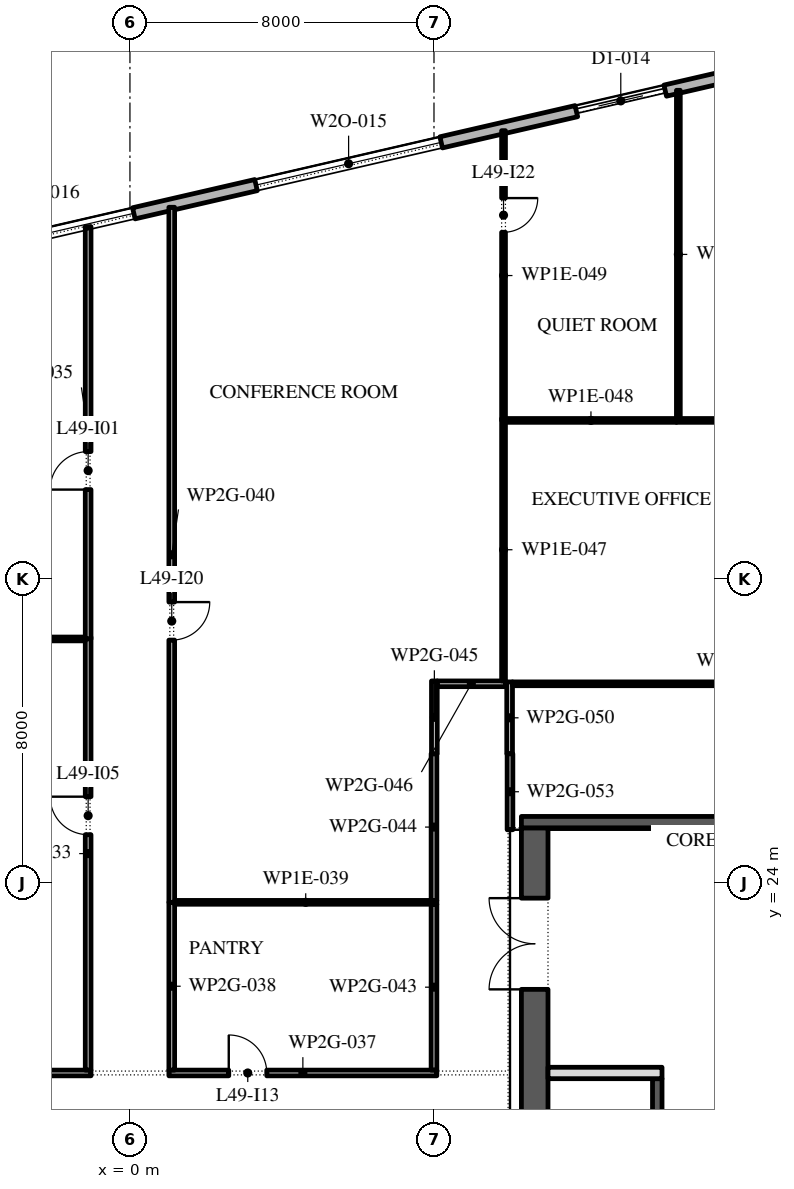
"""IFC4 building model, lengths in metres.
Left out: names, types, materials, properties, quantities, classifications, styles, units other than length and angle.
Written with IfcOpenShell. Run it as: python <this file> out.ifc"""

import sys

from ifc_helpers import new_model, si_unit, direction, frame, frame_2d, origin, place, context, subcontext, project, spatial, rectangle, extrude, element, fill, save


model = new_model("IFC4")
c1 = context("Model", 3, precision=1e-05, world=origin(), true_north=direction((0.0, 1.0)))
c2 = subcontext(c1, "Body", "Model", "MODEL_VIEW")
j1 = project(units=[si_unit("LENGTHUNIT", "METRE"), si_unit("PLANEANGLEUNIT", "RADIAN")], contexts=[c1])
p1 = place(None, origin())
s1 = spatial("IfcSite", under=j1, at=p1, CompositionType="ELEMENT")
p2 = place(p1, origin())
s2 = spatial("IfcBuilding", under=s1, at=p2, CompositionType="ELEMENT")
p3 = place(p2, frame((0.0, 0.0, 222.0)))
s3 = spatial("IfcBuildingStorey", under=s2, at=p3, CompositionType="ELEMENT", Elevation=222.0)
p4 = place(p3, frame((17.592, 45.657, 0.0), z_axis=(0.0, 0.0, 1.0), x_axis=(-0.974370243697, -0.224950279389, 0.0)))
e1 = element("IfcWall", 1, at=p4, inside=s3, PredefinedType="STANDARD", context=c2, shape_type="SweptSolid", body=[
    extrude(rectangle(XDim=49.5, YDim=0.3, at=frame_2d((24.75, 0.0))), origin(), (0.0, 0.0, 1.0), 3.75),
])
p5 = place(p4, frame((3.6, 0.0, 0.0)))
e2 = element("IfcOpeningElement", 2, at=p5, cuts=e1, PredefinedType="OPENING", context=c2, shape_type="SweptSolid", body=[
    extrude(rectangle(XDim=2.4, YDim=3.5, at=frame_2d((1.2, 1.75))), frame((0.0, 0.16, 0.0), z_axis=(0.0, -1.0, 0.0), x_axis=(1.0, 0.0, 0.0)), (0.0, 0.0, 1.0), 0.32),
])
p6 = place(p4, frame((9.65, 0.0, 0.45)))
e3 = element("IfcOpeningElement", 3, at=p6, cuts=e1, PredefinedType="OPENING", context=c2, shape_type="SweptSolid", body=[
    extrude(rectangle(XDim=5.0, YDim=2.2, at=frame_2d((2.5, 1.1))), frame((0.0, 0.16, 0.0), z_axis=(0.0, -1.0, 0.0), x_axis=(1.0, 0.0, 0.0)), (0.0, 0.0, 1.0), 0.32),
])
p7 = place(p4, frame((17.95, 0.0, 0.45)))
e4 = element("IfcOpeningElement", 4, at=p7, cuts=e1, PredefinedType="OPENING", context=c2, shape_type="SweptSolid", body=[
    extrude(rectangle(XDim=5.0, YDim=2.2, at=frame_2d((2.5, 1.1))), frame((0.0, 0.16, 0.0), z_axis=(0.0, -1.0, 0.0), x_axis=(1.0, 0.0, 0.0)), (0.0, 0.0, 1.0), 0.32),
])
p8 = place(p4, frame((26.25, 0.0, 0.45)))
e5 = element("IfcOpeningElement", 5, at=p8, cuts=e1, PredefinedType="OPENING", context=c2, shape_type="SweptSolid", body=[
    extrude(rectangle(XDim=5.0, YDim=2.2, at=frame_2d((2.5, 1.1))), frame((0.0, 0.16, 0.0), z_axis=(0.0, -1.0, 0.0), x_axis=(1.0, 0.0, 0.0)), (0.0, 0.0, 1.0), 0.32),
])
p9 = place(p4, frame((35.85, 0.0, 0.0)))
e6 = element("IfcOpeningElement", 6, at=p9, cuts=e1, PredefinedType="OPENING", context=c2, shape_type="SweptSolid", body=[
    extrude(rectangle(XDim=2.4, YDim=2.7, at=frame_2d((1.2, 1.35))), frame((0.0, 0.16, 0.0), z_axis=(0.0, -1.0, 0.0), x_axis=(1.0, 0.0, 0.0)), (0.0, 0.0, 1.0), 0.32),
])
p10 = place(p4, frame((42.85, 0.0, 0.45)))
e7 = element("IfcOpeningElement", 7, at=p10, cuts=e1, PredefinedType="OPENING", context=c2, shape_type="SweptSolid", body=[
    extrude(rectangle(XDim=5.0, YDim=2.275, at=frame_2d((2.5, 1.137))), frame((0.0, 0.16, 0.0), z_axis=(0.0, -1.0, 0.0), x_axis=(1.0, 0.0, 0.0)), (0.0, 0.0, 1.0), 0.32),
])
p11 = place(p3, frame((10.65, -2.45, 0.0), z_axis=(0.0, 0.0, 1.0), x_axis=(0.0, 1.0, 0.0)))
e8 = element("IfcWall", 8, at=p11, inside=s3, PredefinedType="SHEAR", context=c2, shape_type="SweptSolid", body=[
    extrude(rectangle(XDim=27.9, YDim=0.7, at=frame_2d((13.95, 0.0))), origin(), (0.0, 0.0, 1.0), 3.75),
])
p12 = place(p11, frame((23.65, 0.0, 0.0)))
e9 = element("IfcOpeningElement", 9, at=p12, cuts=e8, PredefinedType="OPENING", context=c2, shape_type="SweptSolid", body=[
    extrude(rectangle(XDim=2.4, YDim=2.1, at=frame_2d((1.2, 1.05))), frame((0.0, 0.36, 0.0), z_axis=(0.0, -1.0, 0.0), x_axis=(1.0, 0.0, 0.0)), (0.0, 0.0, 1.0), 0.72),
])
p13 = place(p11, frame((0.788, 0.0, 0.0)))
e10 = element("IfcOpeningElement", 10, at=p13, cuts=e8, PredefinedType="OPENING", context=c2, shape_type="SweptSolid", body=[
    extrude(rectangle(XDim=0.9, YDim=2.1, at=frame_2d((0.45, 1.05))), frame((0.0, 0.36, 0.0), z_axis=(0.0, -1.0, 0.0), x_axis=(1.0, 0.0, 0.0)), (0.0, 0.0, 1.0), 0.72),
])
p14 = place(p11, frame((3.962, 0.0, 0.0)))
e11 = element("IfcOpeningElement", 11, at=p14, cuts=e8, PredefinedType="OPENING", context=c2, shape_type="SweptSolid", body=[
    extrude(rectangle(XDim=1.0, YDim=2.1, at=frame_2d((0.5, 1.05))), frame((0.0, 0.36, 0.0), z_axis=(0.0, -1.0, 0.0), x_axis=(1.0, 0.0, 0.0)), (0.0, 0.0, 1.0), 0.72),
])
p15 = place(p3, frame((10.3, 25.6, 0.0), z_axis=(0.0, 0.0, 1.0), x_axis=(1.0, 0.0, 0.0)))
e12 = element("IfcWall", 12, at=p15, inside=s3, PredefinedType="SHEAR", context=c2, shape_type="SweptSolid", body=[
    extrude(rectangle(XDim=11.4, YDim=0.3, at=frame_2d((5.7, 0.0))), origin(), (0.0, 0.0, 1.0), 3.75),
])
p16 = place(p3, frame((13.875, -2.45, 0.0), z_axis=(0.0, 0.0, 1.0), x_axis=(0.0, 1.0, 0.0)))
e13 = element("IfcWall", 13, at=p16, inside=s3, PredefinedType="SHEAR", context=c2, shape_type="SweptSolid", body=[
    extrude(rectangle(XDim=21.3, YDim=0.25, at=frame_2d((10.65, 0.0))), origin(), (0.0, 0.0, 1.0), 3.75),
])
p17 = place(p16, frame((17.786, 0.0, 0.0)))
e14 = element("IfcOpeningElement", 14, at=p17, cuts=e13, PredefinedType="OPENING", context=c2, shape_type="SweptSolid", body=[
    extrude(rectangle(XDim=0.9, YDim=2.1, at=frame_2d((0.45, 1.05))), frame((0.0, 0.135, 0.0), z_axis=(0.0, -1.0, 0.0), x_axis=(1.0, 0.0, 0.0)), (0.0, 0.0, 1.0), 0.27),
])
p18 = place(p16, frame((6.971, 0.0, 0.0)))
e15 = element("IfcOpeningElement", 15, at=p18, cuts=e13, PredefinedType="OPENING", context=c2, shape_type="SweptSolid", body=[
    extrude(rectangle(XDim=1.1, YDim=2.1, at=frame_2d((0.55, 1.05))), frame((0.0, 0.135, 0.0), z_axis=(0.0, -1.0, 0.0), x_axis=(1.0, 0.0, 0.0)), (0.0, 0.0, 1.0), 0.27),
])
p19 = place(p16, frame((9.114, 0.0, 0.0)))
e16 = element("IfcOpeningElement", 16, at=p19, cuts=e13, PredefinedType="OPENING", context=c2, shape_type="SweptSolid", body=[
    extrude(rectangle(XDim=1.1, YDim=2.1, at=frame_2d((0.55, 1.05))), frame((0.0, 0.135, 0.0), z_axis=(0.0, -1.0, 0.0), x_axis=(1.0, 0.0, 0.0)), (0.0, 0.0, 1.0), 0.27),
])
p20 = place(p16, frame((11.257, 0.0, 0.0)))
e17 = element("IfcOpeningElement", 17, at=p20, cuts=e13, PredefinedType="OPENING", context=c2, shape_type="SweptSolid", body=[
    extrude(rectangle(XDim=1.1, YDim=2.1, at=frame_2d((0.55, 1.05))), frame((0.0, 0.135, 0.0), z_axis=(0.0, -1.0, 0.0), x_axis=(1.0, 0.0, 0.0)), (0.0, 0.0, 1.0), 0.27),
])
p21 = place(p16, frame((13.4, 0.0, 0.0)))
e18 = element("IfcOpeningElement", 18, at=p21, cuts=e13, PredefinedType="OPENING", context=c2, shape_type="SweptSolid", body=[
    extrude(rectangle(XDim=1.1, YDim=2.1, at=frame_2d((0.55, 1.05))), frame((0.0, 0.135, 0.0), z_axis=(0.0, -1.0, 0.0), x_axis=(1.0, 0.0, 0.0)), (0.0, 0.0, 1.0), 0.27),
])
p22 = place(p3, frame((11.0, 19.0, 0.0), z_axis=(0.0, 0.0, 1.0), x_axis=(1.0, 0.0, 0.0)))
e19 = element("IfcWall", 19, at=p22, inside=s3, PredefinedType="PARTITIONING", context=c2, shape_type="SweptSolid", body=[
    extrude(rectangle(XDim=3.0, YDim=0.3, at=frame_2d((1.5, 0.0))), origin(), (0.0, 0.0, 1.0), 3.75),
])
p23 = place(p3, frame((-8.075, 19.0, 0.0), z_axis=(0.0, 0.0, 1.0), x_axis=(1.0, 0.0, 0.0)))
e20 = element("IfcWall", 20, at=p23, inside=s3, PredefinedType="PARTITIONING", context=c2, shape_type="SweptSolid", body=[
    extrude(rectangle(XDim=7.05, YDim=0.15, at=frame_2d((3.525, 0.0))), origin(), (0.0, 0.0, 1.0), 3.75),
])
p24 = place(p3, frame((-1.1, 19.075, 0.0), z_axis=(0.0, 0.0, 1.0), x_axis=(0.0, 1.0, 0.0)))
e21 = element("IfcWall", 21, at=p24, inside=s3, PredefinedType="PARTITIONING", context=c2, shape_type="SweptSolid", body=[
    extrude(rectangle(XDim=11.395, YDim=0.15, at=frame_2d((5.698, 0.0))), origin(), (0.0, 0.0, 1.0), 3.75),
])
p25 = place(p24, frame((6.195, 0.0, 0.0)))
e22 = element("IfcOpeningElement", 22, at=p25, cuts=e21, PredefinedType="OPENING", context=c2, shape_type="SweptSolid", body=[
    extrude(rectangle(XDim=1.0, YDim=2.1, at=frame_2d((0.5, 1.05))), frame((0.0, 0.085, 0.0), z_axis=(0.0, -1.0, 0.0), x_axis=(1.0, 0.0, 0.0)), (0.0, 0.0, 1.0), 0.17),
])
p26 = place(p3, frame((-1.175, 30.42, 0.0), z_axis=(0.0, 0.0, 1.0), x_axis=(-1.0, 0.0, 0.0)))
e23 = element("IfcWall", 23, at=p26, inside=s3, PredefinedType="PARTITIONING", context=c2, shape_type="SweptSolid", body=[
    extrude(rectangle(XDim=5.165, YDim=0.1, at=frame_2d((2.583, 0.0))), origin(), (0.0, 0.0, 1.0), 3.75),
])
p27 = place(p3, frame((-1.1, 30.42, 0.0), z_axis=(0.0, 0.0, 1.0), x_axis=(0.0, 1.0, 0.0)))
e24 = element("IfcWall", 24, at=p27, inside=s3, PredefinedType="PARTITIONING", context=c2, shape_type="SweptSolid", body=[
    extrude(rectangle(XDim=10.85, YDim=0.15, at=frame_2d((5.425, 0.0))), origin(), (0.0, 0.0, 1.0), 3.75),
])
p28 = place(p27, frame((3.93, 0.0, 0.0)))
e25 = element("IfcOpeningElement", 25, at=p28, cuts=e24, PredefinedType="OPENING", context=c2, shape_type="SweptSolid", body=[
    extrude(rectangle(XDim=1.0, YDim=2.1, at=frame_2d((0.5, 1.05))), frame((0.0, 0.085, 0.0), z_axis=(0.0, -1.0, 0.0), x_axis=(1.0, 0.0, 0.0)), (0.0, 0.0, 1.0), 0.17),
])
p29 = place(p3, frame((1.025, 19.0, 0.0), z_axis=(0.0, 0.0, 1.0), x_axis=(1.0, 0.0, 0.0)))
e26 = element("IfcWall", 26, at=p29, inside=s3, PredefinedType="PARTITIONING", context=c2, shape_type="SweptSolid", body=[
    extrude(rectangle(XDim=7.05, YDim=0.15, at=frame_2d((3.525, 0.0))), origin(), (0.0, 0.0, 1.0), 3.75),
])
p30 = place(p29, frame((1.575, 0.0, 0.0)))
e27 = element("IfcOpeningElement", 27, at=p30, cuts=e26, PredefinedType="OPENING", context=c2, shape_type="SweptSolid", body=[
    extrude(rectangle(XDim=1.0, YDim=2.1, at=frame_2d((0.5, 1.05))), frame((0.0, 0.085, 0.0), z_axis=(0.0, -1.0, 0.0), x_axis=(1.0, 0.0, 0.0)), (0.0, 0.0, 1.0), 0.17),
])
p31 = place(p3, frame((1.1, 23.49, 0.0), z_axis=(0.0, 0.0, 1.0), x_axis=(0.0, -1.0, 0.0)))
e28 = element("IfcWall", 28, at=p31, inside=s3, PredefinedType="PARTITIONING", context=c2, shape_type="SweptSolid", body=[
    extrude(rectangle(XDim=4.415, YDim=0.15, at=frame_2d((2.208, 0.0))), origin(), (0.0, 0.0, 1.0), 3.75),
])
p32 = place(p3, frame((1.175, 23.49, 0.0), z_axis=(0.0, 0.0, 1.0), x_axis=(1.0, 0.0, 0.0)))
e29 = element("IfcWall", 29, at=p32, inside=s3, PredefinedType="PARTITIONING", context=c2, shape_type="SweptSolid", body=[
    extrude(rectangle(XDim=6.9, YDim=0.1, at=frame_2d((3.45, 0.0))), origin(), (0.0, 0.0, 1.0), 3.75),
])
p33 = place(p3, frame((1.1, 41.778, 0.0), z_axis=(0.0, 0.0, 1.0), x_axis=(0.0, -1.0, 0.0)))
e30 = element("IfcWall", 30, at=p33, inside=s3, PredefinedType="PARTITIONING", context=c2, shape_type="SweptSolid", body=[
    extrude(rectangle(XDim=18.288, YDim=0.15, at=frame_2d((9.144, 0.0))), origin(), (0.0, 0.0, 1.0), 3.75),
])
p34 = place(p33, frame((10.388, 0.0, 0.0)))
e31 = element("IfcOpeningElement", 31, at=p34, cuts=e30, PredefinedType="OPENING", context=c2, shape_type="SweptSolid", body=[
    extrude(rectangle(XDim=1.0, YDim=2.1, at=frame_2d((0.5, 1.05))), frame((0.0, 0.085, 0.0), z_axis=(0.0, -1.0, 0.0), x_axis=(1.0, 0.0, 0.0)), (0.0, 0.0, 1.0), 0.17),
])
p35 = place(p3, frame((8.0, 19.075, 0.0), z_axis=(0.0, 0.0, 1.0), x_axis=(0.0, 1.0, 0.0)))
e32 = element("IfcWall", 32, at=p35, inside=s3, PredefinedType="PARTITIONING", context=c2, shape_type="SweptSolid", body=[
    extrude(rectangle(XDim=4.365, YDim=0.15, at=frame_2d((2.183, 0.0))), origin(), (0.0, 0.0, 1.0), 3.75),
])
p36 = place(p3, frame((8.0, 23.54, 0.0), z_axis=(0.0, 0.0, 1.0), x_axis=(0.0, 1.0, 0.0)))
e33 = element("IfcWall", 33, at=p36, inside=s3, PredefinedType="PARTITIONING", context=c2, shape_type="SweptSolid", body=[
    extrude(rectangle(XDim=3.86, YDim=0.15, at=frame_2d((1.93, 0.0))), origin(), (0.0, 0.0, 1.0), 3.75),
])
p37 = place(p3, frame((8.01, 27.4, 0.0), z_axis=(0.0, 0.0, 1.0), x_axis=(0.0, 1.0, 0.0)))
e34 = element("IfcWall", 34, at=p37, inside=s3, PredefinedType="PARTITIONING", context=c2, shape_type="SweptSolid", body=[
    extrude(rectangle(XDim=1.915, YDim=0.15, at=frame_2d((0.958, 0.0))), origin(), (0.0, 0.0, 1.0), 3.75),
])
p38 = place(p3, frame((8.085, 29.24, 0.0), z_axis=(0.0, 0.0, 1.0), x_axis=(1.0, 0.0, 0.0)))
e35 = element("IfcWall", 35, at=p38, inside=s3, PredefinedType="PARTITIONING", context=c2, shape_type="SweptSolid", body=[
    extrude(rectangle(XDim=1.795, YDim=0.15, at=frame_2d((0.897, 0.0))), origin(), (0.0, 0.0, 1.0), 3.75),
])
p39 = place(p3, frame((9.83, 36.22, 0.0), z_axis=(0.0, 0.0, 1.0), x_axis=(0.0, -1.0, 0.0)))
e36 = element("IfcWall", 36, at=p39, inside=s3, PredefinedType="PARTITIONING", context=c2, shape_type="SweptSolid", body=[
    extrude(rectangle(XDim=6.905, YDim=0.1, at=frame_2d((3.453, 0.0))), origin(), (0.0, 0.0, 1.0), 3.75),
])
p40 = place(p3, frame((9.88, 36.17, 0.0), z_axis=(0.0, 0.0, 1.0), x_axis=(1.0, 0.0, 0.0)))
e37 = element("IfcWall", 37, at=p40, inside=s3, PredefinedType="PARTITIONING", context=c2, shape_type="SweptSolid", body=[
    extrude(rectangle(XDim=4.5, YDim=0.1, at=frame_2d((2.25, 0.0))), origin(), (0.0, 0.0, 1.0), 3.75),
])
p41 = place(p3, frame((9.83, 43.794, 0.0), z_axis=(0.0, 0.0, 1.0), x_axis=(0.0, -1.0, 0.0)))
e38 = element("IfcWall", 38, at=p41, inside=s3, PredefinedType="PARTITIONING", context=c2, shape_type="SweptSolid", body=[
    extrude(rectangle(XDim=7.624, YDim=0.1, at=frame_2d((3.812, 0.0))), origin(), (0.0, 0.0, 1.0), 3.75),
])
p42 = place(p41, frame((1.774, 0.0, 0.0)))
e39 = element("IfcOpeningElement", 39, at=p42, cuts=e38, PredefinedType="OPENING", context=c2, shape_type="SweptSolid", body=[
    extrude(rectangle(XDim=0.9, YDim=2.1, at=frame_2d((0.45, 1.05))), frame((0.0, 0.06, 0.0), z_axis=(0.0, -1.0, 0.0), x_axis=(1.0, 0.0, 0.0)), (0.0, 0.0, 1.0), 0.12),
])
p43 = place(p3, frame((9.99, 29.29, 0.0), z_axis=(0.0, 0.0, 1.0), x_axis=(0.0, -1.0, 0.0)))
e40 = element("IfcWall", 40, at=p43, inside=s3, PredefinedType="PARTITIONING", context=c2, shape_type="SweptSolid", body=[
    extrude(rectangle(XDim=1.89, YDim=0.15, at=frame_2d((0.945, 0.0))), origin(), (0.0, 0.0, 1.0), 3.75),
])
p44 = place(p3, frame((10.065, 29.24, 0.0), z_axis=(0.0, 0.0, 1.0), x_axis=(1.0, 0.0, 0.0)))
e41 = element("IfcWall", 41, at=p44, inside=s3, PredefinedType="PARTITIONING", context=c2, shape_type="SweptSolid", body=[
    extrude(rectangle(XDim=11.945, YDim=0.1, at=frame_2d((5.973, 0.0))), origin(), (0.0, 0.0, 1.0), 3.75),
])
p45 = place(p3, frame((10.0, 27.4, 0.0), z_axis=(0.0, 0.0, 1.0), x_axis=(0.0, -1.0, 0.0)))
e42 = element("IfcWall", 42, at=p45, inside=s3, PredefinedType="PARTITIONING", context=c2, shape_type="SweptSolid", body=[
    extrude(rectangle(XDim=2.0, YDim=0.15, at=frame_2d((1.0, 0.0))), origin(), (0.0, 0.0, 1.0), 3.75),
])
p46 = place(p3, frame((14.38, 36.17, 0.0), z_axis=(0.0, 0.0, 1.0), x_axis=(1.0, 0.0, 0.0)))
e43 = element("IfcWall", 43, at=p46, inside=s3, PredefinedType="PARTITIONING", context=c2, shape_type="SweptSolid", body=[
    extrude(rectangle(XDim=9.18, YDim=0.1, at=frame_2d((4.59, 0.0))), origin(), (0.0, 0.0, 1.0), 3.75),
])
p47 = place(p46, frame((2.3, 0.0, 0.0)))
e44 = element("IfcOpeningElement", 44, at=p47, cuts=e43, PredefinedType="OPENING", context=c2, shape_type="SweptSolid", body=[
    extrude(rectangle(XDim=0.9, YDim=2.1, at=frame_2d((0.45, 1.05))), frame((0.0, 0.06, 0.0), z_axis=(0.0, -1.0, 0.0), x_axis=(1.0, 0.0, 0.0)), (0.0, 0.0, 1.0), 0.12),
])
p48 = place(p3, frame((14.43, 44.856, 0.0), z_axis=(0.0, 0.0, 1.0), x_axis=(0.0, -1.0, 0.0)))
e45 = element("IfcWall", 45, at=p48, inside=s3, PredefinedType="PARTITIONING", context=c2, shape_type="SweptSolid", body=[
    extrude(rectangle(XDim=8.636, YDim=0.1, at=frame_2d((4.318, 0.0))), origin(), (0.0, 0.0, 1.0), 3.75),
])
p49 = place(p5, origin())
e46 = element("IfcDoor", 46, at=p49, inside=s3, OperationType="DOUBLE_DOOR_SLIDING", PredefinedType="DOOR", context=c2, shape_type="SweptSolid", body=[
    extrude(rectangle(XDim=2.4, YDim=3.5, at=frame_2d((1.2, 1.75))), frame((0.0, 0.025, 0.0), z_axis=(0.0, -1.0, 0.0), x_axis=(1.0, 0.0, 0.0)), (0.0, 0.0, 1.0), 0.05),
])
fill(e2, e46)
p50 = place(p6, origin())
e47 = element("IfcWindow", 47, at=p50, inside=s3, PartitioningType="DOUBLE_PANEL_VERTICAL", PredefinedType="WINDOW", context=c2, shape_type="SweptSolid", body=[
    extrude(rectangle(XDim=5.0, YDim=2.2, at=frame_2d((2.5, 1.1))), frame((0.0, 0.03, 0.0), z_axis=(0.0, -1.0, 0.0), x_axis=(1.0, 0.0, 0.0)), (0.0, 0.0, 1.0), 0.06),
])
fill(e3, e47)
p51 = place(p7, origin())
e48 = element("IfcWindow", 48, at=p51, inside=s3, PartitioningType="DOUBLE_PANEL_VERTICAL", PredefinedType="WINDOW", context=c2, shape_type="SweptSolid", body=[
    extrude(rectangle(XDim=5.0, YDim=2.2, at=frame_2d((2.5, 1.1))), frame((0.0, 0.03, 0.0), z_axis=(0.0, -1.0, 0.0), x_axis=(1.0, 0.0, 0.0)), (0.0, 0.0, 1.0), 0.06),
])
fill(e4, e48)
p52 = place(p12, origin())
e49 = element("IfcDoor", 49, at=p52, inside=s3, OperationType="DOUBLE_DOOR_SINGLE_SWING", PredefinedType="DOOR", context=c2, shape_type="SweptSolid", body=[
    extrude(rectangle(XDim=2.4, YDim=2.1, at=frame_2d((1.2, 1.05))), frame((0.0, 0.025, 0.0), z_axis=(0.0, -1.0, 0.0), x_axis=(1.0, 0.0, 0.0)), (0.0, 0.0, 1.0), 0.05),
])
fill(e9, e49)
p53 = place(p28, origin())
e50 = element("IfcDoor", 50, at=p53, inside=s3, OperationType="SINGLE_SWING_RIGHT", PredefinedType="DOOR", context=c2, shape_type="SweptSolid", body=[
    extrude(rectangle(XDim=1.0, YDim=2.1, at=frame_2d((0.5, 1.05))), frame((0.0, 0.025, 0.0), z_axis=(0.0, -1.0, 0.0), x_axis=(1.0, 0.0, 0.0)), (0.0, 0.0, 1.0), 0.05),
])
fill(e25, e50)
p54 = place(p25, origin())
e51 = element("IfcDoor", 51, at=p54, inside=s3, OperationType="SINGLE_SWING_LEFT", PredefinedType="DOOR", context=c2, shape_type="SweptSolid", body=[
    extrude(rectangle(XDim=1.0, YDim=2.1, at=frame_2d((0.5, 1.05))), frame((0.0, 0.025, 0.0), z_axis=(0.0, -1.0, 0.0), x_axis=(1.0, 0.0, 0.0)), (0.0, 0.0, 1.0), 0.05),
])
fill(e22, e51)
p55 = place(p30, origin())
e52 = element("IfcDoor", 52, at=p55, inside=s3, OperationType="SINGLE_SWING_RIGHT", PredefinedType="DOOR", context=c2, shape_type="SweptSolid", body=[
    extrude(rectangle(XDim=1.0, YDim=2.1, at=frame_2d((0.5, 1.05))), frame((0.0, 0.025, 0.0), z_axis=(0.0, -1.0, 0.0), x_axis=(1.0, 0.0, 0.0)), (0.0, 0.0, 1.0), 0.05),
])
fill(e27, e52)
p56 = place(p34, origin())
e53 = element("IfcDoor", 53, at=p56, inside=s3, OperationType="SINGLE_SWING_RIGHT", PredefinedType="DOOR", context=c2, shape_type="SweptSolid", body=[
    extrude(rectangle(XDim=1.0, YDim=2.1, at=frame_2d((0.5, 1.05))), frame((0.0, 0.025, 0.0), z_axis=(0.0, -1.0, 0.0), x_axis=(1.0, 0.0, 0.0)), (0.0, 0.0, 1.0), 0.05),
])
fill(e31, e53)
p57 = place(p42, origin())
e54 = element("IfcDoor", 54, at=p57, inside=s3, OperationType="SINGLE_SWING_RIGHT", PredefinedType="DOOR", context=c2, shape_type="SweptSolid", body=[
    extrude(rectangle(XDim=0.9, YDim=2.1, at=frame_2d((0.45, 1.05))), frame((0.0, 0.025, 0.0), z_axis=(0.0, -1.0, 0.0), x_axis=(1.0, 0.0, 0.0)), (0.0, 0.0, 1.0), 0.05),
])
fill(e39, e54)
save(model, sys.argv[1])
